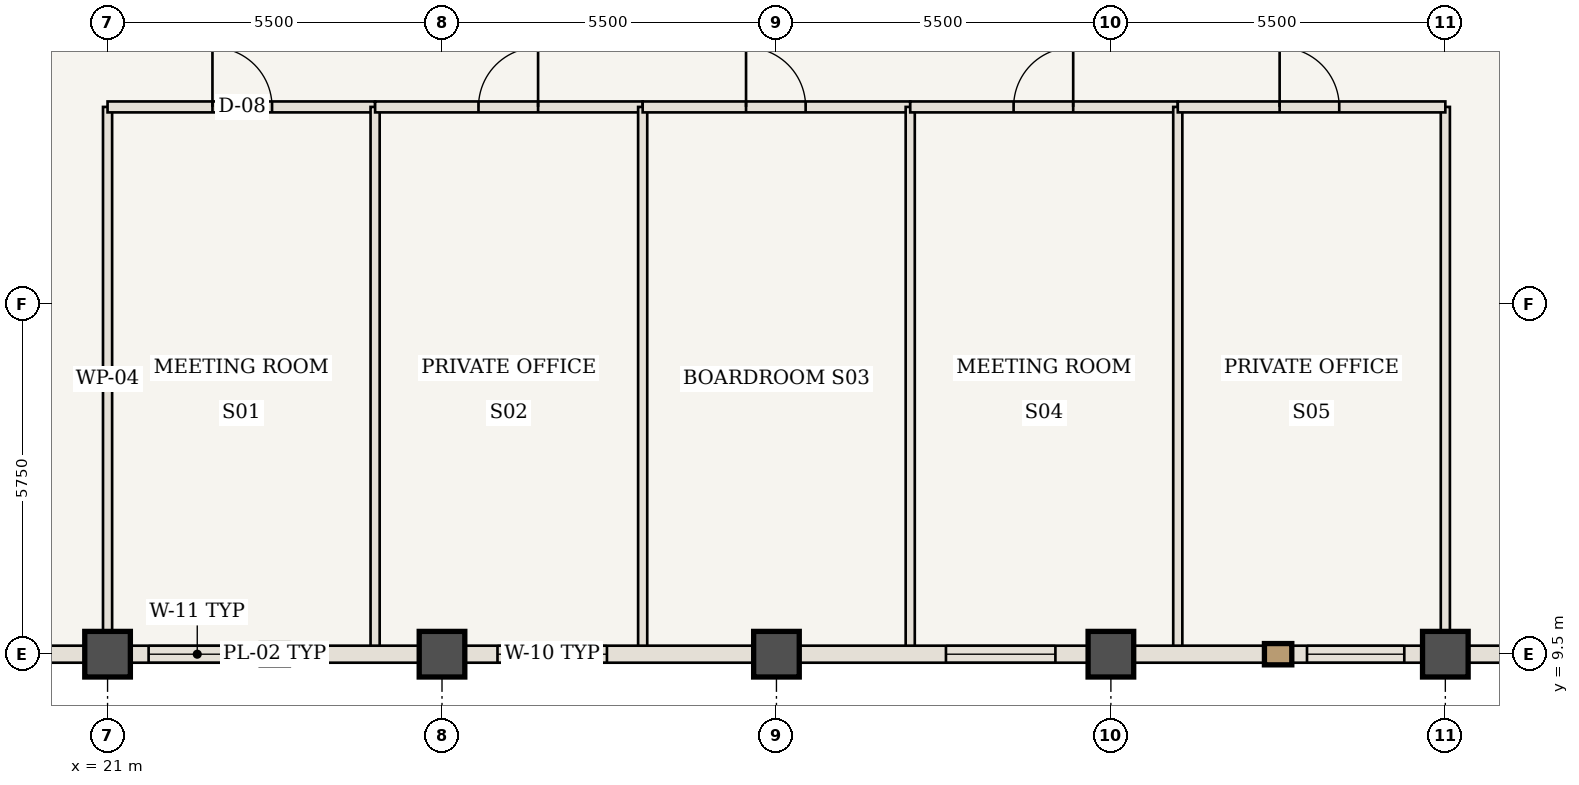
"""IFC4 building model, lengths in metres.
Left out: names, types, materials, properties, quantities, classifications, styles, units other than length and angle.
Written with IfcOpenShell. Run it as: python <this file> out.ifc"""

import sys

from ifc_helpers import new_model, si_unit, direction, frame, frame_2d, origin, origin_2d, place, context, subcontext, project, spatial, rectangle, extrude, element, fill, save


model = new_model("IFC4")
c1 = context("Model", 3, precision=1e-05, world=origin(), true_north=direction((0.0, 1.0)))
c2 = subcontext(c1, "Body", "Model", "MODEL_VIEW")
j1 = project(units=[si_unit("LENGTHUNIT", "METRE"), si_unit("PLANEANGLEUNIT", "RADIAN")], contexts=[c1])
p1 = place(None, origin())
s1 = spatial("IfcSite", under=j1, at=p1, CompositionType="ELEMENT")
p2 = place(p1, origin())
s2 = spatial("IfcBuilding", under=s1, at=p2, CompositionType="ELEMENT")
p3 = place(p2, frame((0.0, 0.0, 289.1)))
s3 = spatial("IfcBuildingStorey", under=s2, at=p3, CompositionType="ELEMENT", Elevation=289.1)
for number, where, z_axis, x_axis in (
    (1, (21.0, 9.5, 0.0), (0.0, 0.0, 1.0), (1.0, 0.0, 0.0)),
    (2, (26.5, 9.5, 0.0), (0.0, 0.0, 1.0), (1.0, 0.0, 0.0)),
    (3, (32.0, 9.5, 0.0), (0.0, 0.0, 1.0), (1.0, 0.0, 0.0)),
    (4, (37.5, 9.5, 0.0), (0.0, 0.0, 1.0), (1.0, 0.0, 0.0)),
    (5, (43.0, 9.5, 0.0), (0.0, 0.0, 1.0), (1.0, 0.0, 0.0)),
):
    element("IfcColumn", number, at=place(p3, frame(where, z_axis=z_axis, x_axis=x_axis)), inside=s3, PredefinedType="COLUMN", context=c2, shape_type="SweptSolid", body=[
        extrude(rectangle(XDim=0.75, YDim=0.75, at=origin_2d()), origin(), (0.0, 0.0, 1.0), 3.85),
    ])
for number, where, z_axis, x_axis in (
    (6, (21.0, 9.56, 0.0), (0.0, 0.0, 1.0), (0.0, 1.0, 0.0)),
    (7, (43.0, 9.56, 0.0), (0.0, 0.0, 1.0), (0.0, 1.0, 0.0)),
):
    element("IfcWall", number, at=place(p3, frame(where, z_axis=z_axis, x_axis=x_axis)), inside=s3, PredefinedType="STANDARD", context=c2, shape_type="SweptSolid", body=[
        extrude(rectangle(XDim=8.94, YDim=0.15, at=frame_2d((4.47, 0.0))), origin(), (0.0, 0.0, 1.0), 3.685),
    ])
p4 = place(p3, frame((21.0, 18.5, 0.0), z_axis=(0.0, 0.0, 1.0), x_axis=(1.0, 0.0, 0.0)))
e8 = element("IfcWall", 8, at=p4, inside=s3, PredefinedType="STANDARD", context=c2, shape_type="SweptSolid", body=[
    extrude(rectangle(XDim=4.4, YDim=0.18, at=frame_2d((2.2, 0.0))), origin(), (0.0, 0.0, 1.0), 3.685),
])
p5 = place(p4, frame((1.725, 0.0, 0.0)))
e9 = element("IfcOpeningElement", 9, at=p5, cuts=e8, PredefinedType="OPENING", context=c2, shape_type="SweptSolid", body=[
    extrude(rectangle(XDim=0.98, YDim=2.2, at=frame_2d((0.49, 1.1))), frame((0.0, 0.1, 0.0), z_axis=(0.0, -1.0, 0.0), x_axis=(1.0, 0.0, 0.0)), (0.0, 0.0, 1.0), 0.2),
])
p6 = place(p3, frame((25.4, 9.56, 0.0), z_axis=(0.0, 0.0, 1.0), x_axis=(0.0, 1.0, 0.0)))
e10 = element("IfcWall", 10, at=p6, inside=s3, PredefinedType="STANDARD", context=c2, shape_type="SweptSolid", body=[
    extrude(rectangle(XDim=8.94, YDim=0.15, at=frame_2d((4.47, 0.0))), origin(), (0.0, 0.0, 1.0), 3.685),
])
p7 = place(p3, frame((25.4, 18.5, 0.0), z_axis=(0.0, 0.0, 1.0), x_axis=(1.0, 0.0, 0.0)))
e11 = element("IfcWall", 11, at=p7, inside=s3, PredefinedType="STANDARD", context=c2, shape_type="SweptSolid", body=[
    extrude(rectangle(XDim=4.4, YDim=0.18, at=frame_2d((2.2, 0.0))), origin(), (0.0, 0.0, 1.0), 3.685),
])
p8 = place(p7, frame((1.7, 0.0, 0.0)))
e12 = element("IfcOpeningElement", 12, at=p8, cuts=e11, PredefinedType="OPENING", context=c2, shape_type="SweptSolid", body=[
    extrude(rectangle(XDim=0.98, YDim=2.2, at=frame_2d((0.49, 1.1))), frame((0.0, 0.1, 0.0), z_axis=(0.0, -1.0, 0.0), x_axis=(1.0, 0.0, 0.0)), (0.0, 0.0, 1.0), 0.2),
])
p9 = place(p3, frame((29.8, 9.56, 0.0), z_axis=(0.0, 0.0, 1.0), x_axis=(0.0, 1.0, 0.0)))
e13 = element("IfcWall", 13, at=p9, inside=s3, PredefinedType="STANDARD", context=c2, shape_type="SweptSolid", body=[
    extrude(rectangle(XDim=8.94, YDim=0.15, at=frame_2d((4.47, 0.0))), origin(), (0.0, 0.0, 1.0), 3.685),
])
p10 = place(p3, frame((29.8, 18.5, 0.0), z_axis=(0.0, 0.0, 1.0), x_axis=(1.0, 0.0, 0.0)))
e14 = element("IfcWall", 14, at=p10, inside=s3, PredefinedType="STANDARD", context=c2, shape_type="SweptSolid", body=[
    extrude(rectangle(XDim=4.4, YDim=0.18, at=frame_2d((2.2, 0.0))), origin(), (0.0, 0.0, 1.0), 3.685),
])
p11 = place(p10, frame((1.7, 0.0, 0.0)))
e15 = element("IfcOpeningElement", 15, at=p11, cuts=e14, PredefinedType="OPENING", context=c2, shape_type="SweptSolid", body=[
    extrude(rectangle(XDim=0.98, YDim=2.2, at=frame_2d((0.49, 1.1))), frame((0.0, 0.1, 0.0), z_axis=(0.0, -1.0, 0.0), x_axis=(1.0, 0.0, 0.0)), (0.0, 0.0, 1.0), 0.2),
])
p12 = place(p3, frame((34.2, 9.56, 0.0), z_axis=(0.0, 0.0, 1.0), x_axis=(0.0, 1.0, 0.0)))
e16 = element("IfcWall", 16, at=p12, inside=s3, PredefinedType="STANDARD", context=c2, shape_type="SweptSolid", body=[
    extrude(rectangle(XDim=8.94, YDim=0.15, at=frame_2d((4.47, 0.0))), origin(), (0.0, 0.0, 1.0), 3.685),
])
p13 = place(p3, frame((34.2, 18.5, 0.0), z_axis=(0.0, 0.0, 1.0), x_axis=(1.0, 0.0, 0.0)))
e17 = element("IfcWall", 17, at=p13, inside=s3, PredefinedType="STANDARD", context=c2, shape_type="SweptSolid", body=[
    extrude(rectangle(XDim=4.4, YDim=0.18, at=frame_2d((2.2, 0.0))), origin(), (0.0, 0.0, 1.0), 3.685),
])
p14 = place(p13, frame((1.7, 0.0, 0.0)))
e18 = element("IfcOpeningElement", 18, at=p14, cuts=e17, PredefinedType="OPENING", context=c2, shape_type="SweptSolid", body=[
    extrude(rectangle(XDim=0.98, YDim=2.2, at=frame_2d((0.49, 1.1))), frame((0.0, 0.1, 0.0), z_axis=(0.0, -1.0, 0.0), x_axis=(1.0, 0.0, 0.0)), (0.0, 0.0, 1.0), 0.2),
])
p15 = place(p3, frame((38.6, 9.56, 0.0), z_axis=(0.0, 0.0, 1.0), x_axis=(0.0, 1.0, 0.0)))
e19 = element("IfcWall", 19, at=p15, inside=s3, PredefinedType="STANDARD", context=c2, shape_type="SweptSolid", body=[
    extrude(rectangle(XDim=8.94, YDim=0.15, at=frame_2d((4.47, 0.0))), origin(), (0.0, 0.0, 1.0), 3.685),
])
p16 = place(p3, frame((38.6, 18.5, 0.0), z_axis=(0.0, 0.0, 1.0), x_axis=(1.0, 0.0, 0.0)))
e20 = element("IfcWall", 20, at=p16, inside=s3, PredefinedType="STANDARD", context=c2, shape_type="SweptSolid", body=[
    extrude(rectangle(XDim=4.4, YDim=0.18, at=frame_2d((2.2, 0.0))), origin(), (0.0, 0.0, 1.0), 3.685),
])
p17 = place(p16, frame((1.675, 0.0, 0.0)))
e21 = element("IfcOpeningElement", 21, at=p17, cuts=e20, PredefinedType="OPENING", context=c2, shape_type="SweptSolid", body=[
    extrude(rectangle(XDim=0.98, YDim=2.2, at=frame_2d((0.49, 1.1))), frame((0.0, 0.1, 0.0), z_axis=(0.0, -1.0, 0.0), x_axis=(1.0, 0.0, 0.0)), (0.0, 0.0, 1.0), 0.2),
])
p18 = place(p3, frame((21.0, 9.5, 0.0), z_axis=(0.0, 0.0, 1.0), x_axis=(-1.0, 0.0, 0.0)))
e22 = element("IfcWall", 22, at=p18, inside=s3, PredefinedType="USERDEFINED", context=c2, shape_type="SweptSolid", body=[
    extrude(rectangle(XDim=5.5, YDim=0.28, at=frame_2d((2.75, 0.0))), origin(), (0.0, 0.0, 1.0), 2.985),
])
p19 = place(p3, frame((26.5, 9.5, 0.0), z_axis=(0.0, 0.0, 1.0), x_axis=(-1.0, 0.0, 0.0)))
e23 = element("IfcWall", 23, at=p19, inside=s3, PredefinedType="USERDEFINED", context=c2, shape_type="SweptSolid", body=[
    extrude(rectangle(XDim=5.5, YDim=0.28, at=frame_2d((2.75, 0.0))), origin(), (0.0, 0.0, 1.0), 2.985),
])
p20 = place(p19, frame((3.225, 0.0, 0.85)))
e24 = element("IfcOpeningElement", 24, at=p20, cuts=e23, PredefinedType="OPENING", context=c2, shape_type="SweptSolid", body=[
    extrude(rectangle(XDim=1.6, YDim=1.935, at=frame_2d((0.8, 0.968))), frame((0.0, 0.15, 0.0), z_axis=(0.0, -1.0, 0.0), x_axis=(1.0, 0.0, 0.0)), (0.0, 0.0, 1.0), 0.3),
])
p21 = place(p3, frame((32.0, 9.5, 0.0), z_axis=(0.0, 0.0, 1.0), x_axis=(-1.0, 0.0, 0.0)))
e25 = element("IfcWall", 25, at=p21, inside=s3, PredefinedType="USERDEFINED", context=c2, shape_type="SweptSolid", body=[
    extrude(rectangle(XDim=5.5, YDim=0.28, at=frame_2d((2.75, 0.0))), origin(), (0.0, 0.0, 1.0), 2.985),
])
p22 = place(p21, frame((2.788, 0.0, 0.85)))
e26 = element("IfcOpeningElement", 26, at=p22, cuts=e25, PredefinedType="OPENING", context=c2, shape_type="SweptSolid", body=[
    extrude(rectangle(XDim=1.8, YDim=1.935, at=frame_2d((0.9, 0.968))), frame((0.0, 0.15, 0.0), z_axis=(0.0, -1.0, 0.0), x_axis=(1.0, 0.0, 0.0)), (0.0, 0.0, 1.0), 0.3),
])
p23 = place(p3, frame((37.5, 9.5, 0.0), z_axis=(0.0, 0.0, 1.0), x_axis=(-1.0, 0.0, 0.0)))
e27 = element("IfcWall", 27, at=p23, inside=s3, PredefinedType="USERDEFINED", context=c2, shape_type="SweptSolid", body=[
    extrude(rectangle(XDim=5.5, YDim=0.28, at=frame_2d((2.75, 0.0))), origin(), (0.0, 0.0, 1.0), 2.985),
])
p24 = place(p23, frame((0.913, 0.0, 0.85)))
e28 = element("IfcOpeningElement", 28, at=p24, cuts=e27, PredefinedType="OPENING", context=c2, shape_type="SweptSolid", body=[
    extrude(rectangle(XDim=1.8, YDim=1.935, at=frame_2d((0.9, 0.968))), frame((0.0, 0.15, 0.0), z_axis=(0.0, -1.0, 0.0), x_axis=(1.0, 0.0, 0.0)), (0.0, 0.0, 1.0), 0.3),
])
p25 = place(p3, frame((43.0, 9.5, 0.0), z_axis=(0.0, 0.0, 1.0), x_axis=(-1.0, 0.0, 0.0)))
e29 = element("IfcWall", 29, at=p25, inside=s3, PredefinedType="USERDEFINED", context=c2, shape_type="SweptSolid", body=[
    extrude(rectangle(XDim=5.5, YDim=0.28, at=frame_2d((2.75, 0.0))), origin(), (0.0, 0.0, 1.0), 2.985),
])
p26 = place(p25, frame((0.675, 0.0, 0.85)))
e30 = element("IfcOpeningElement", 30, at=p26, cuts=e29, PredefinedType="OPENING", context=c2, shape_type="SweptSolid", body=[
    extrude(rectangle(XDim=1.6, YDim=1.935, at=frame_2d((0.8, 0.968))), frame((0.0, 0.15, 0.0), z_axis=(0.0, -1.0, 0.0), x_axis=(1.0, 0.0, 0.0)), (0.0, 0.0, 1.0), 0.3),
])
p27 = place(p3, frame((48.5, 9.5, 0.0), z_axis=(0.0, 0.0, 1.0), x_axis=(-1.0, 0.0, 0.0)))
e31 = element("IfcWall", 31, at=p27, inside=s3, PredefinedType="USERDEFINED", context=c2, shape_type="SweptSolid", body=[
    extrude(rectangle(XDim=5.5, YDim=0.28, at=frame_2d((2.75, 0.0))), origin(), (0.0, 0.0, 1.0), 2.985),
])
p28 = place(p5, origin())
e32 = element("IfcDoor", 32, at=p28, inside=s3, OperationType="SINGLE_SWING_LEFT", PredefinedType="DOOR", context=c2, shape_type="SweptSolid", body=[
    extrude(rectangle(XDim=0.98, YDim=2.2, at=frame_2d((0.49, 1.1))), frame((0.0, 0.025, 0.0), z_axis=(0.0, -1.0, 0.0), x_axis=(1.0, 0.0, 0.0)), (0.0, 0.0, 1.0), 0.05),
])
fill(e9, e32)
p29 = place(p8, origin())
e33 = element("IfcDoor", 33, at=p29, inside=s3, OperationType="SINGLE_SWING_RIGHT", PredefinedType="DOOR", context=c2, shape_type="SweptSolid", body=[
    extrude(rectangle(XDim=0.98, YDim=2.2, at=frame_2d((0.49, 1.1))), frame((0.0, 0.025, 0.0), z_axis=(0.0, -1.0, 0.0), x_axis=(1.0, 0.0, 0.0)), (0.0, 0.0, 1.0), 0.05),
])
fill(e12, e33)
p30 = place(p11, origin())
e34 = element("IfcDoor", 34, at=p30, inside=s3, OperationType="SINGLE_SWING_LEFT", PredefinedType="DOOR", context=c2, shape_type="SweptSolid", body=[
    extrude(rectangle(XDim=0.98, YDim=2.2, at=frame_2d((0.49, 1.1))), frame((0.0, 0.025, 0.0), z_axis=(0.0, -1.0, 0.0), x_axis=(1.0, 0.0, 0.0)), (0.0, 0.0, 1.0), 0.05),
])
fill(e15, e34)
p31 = place(p14, origin())
e35 = element("IfcDoor", 35, at=p31, inside=s3, OperationType="SINGLE_SWING_RIGHT", PredefinedType="DOOR", context=c2, shape_type="SweptSolid", body=[
    extrude(rectangle(XDim=0.98, YDim=2.2, at=frame_2d((0.49, 1.1))), frame((0.0, 0.025, 0.0), z_axis=(0.0, -1.0, 0.0), x_axis=(1.0, 0.0, 0.0)), (0.0, 0.0, 1.0), 0.05),
])
fill(e18, e35)
p32 = place(p17, origin())
e36 = element("IfcDoor", 36, at=p32, inside=s3, OperationType="SINGLE_SWING_LEFT", PredefinedType="DOOR", context=c2, shape_type="SweptSolid", body=[
    extrude(rectangle(XDim=0.98, YDim=2.2, at=frame_2d((0.49, 1.1))), frame((0.0, 0.025, 0.0), z_axis=(0.0, -1.0, 0.0), x_axis=(1.0, 0.0, 0.0)), (0.0, 0.0, 1.0), 0.05),
])
fill(e21, e36)
p33 = place(p20, origin())
e37 = element("IfcWindow", 37, at=p33, inside=s3, PartitioningType="SINGLE_PANEL", PredefinedType="WINDOW", context=c2, shape_type="SweptSolid", body=[
    extrude(rectangle(XDim=1.6, YDim=1.935, at=frame_2d((0.8, 0.968))), frame((0.0, 0.03, 0.0), z_axis=(0.0, -1.0, 0.0), x_axis=(1.0, 0.0, 0.0)), (0.0, 0.0, 1.0), 0.06),
])
fill(e24, e37)
p34 = place(p22, origin())
e38 = element("IfcWindow", 38, at=p34, inside=s3, PartitioningType="SINGLE_PANEL", PredefinedType="WINDOW", context=c2, shape_type="SweptSolid", body=[
    extrude(rectangle(XDim=1.8, YDim=1.935, at=frame_2d((0.9, 0.968))), frame((0.0, 0.03, 0.0), z_axis=(0.0, -1.0, 0.0), x_axis=(1.0, 0.0, 0.0)), (0.0, 0.0, 1.0), 0.06),
])
fill(e26, e38)
p35 = place(p24, origin())
e39 = element("IfcWindow", 39, at=p35, inside=s3, PartitioningType="SINGLE_PANEL", PredefinedType="WINDOW", context=c2, shape_type="SweptSolid", body=[
    extrude(rectangle(XDim=1.8, YDim=1.935, at=frame_2d((0.9, 0.968))), frame((0.0, 0.03, 0.0), z_axis=(0.0, -1.0, 0.0), x_axis=(1.0, 0.0, 0.0)), (0.0, 0.0, 1.0), 0.06),
])
fill(e28, e39)
p36 = place(p26, origin())
e40 = element("IfcWindow", 40, at=p36, inside=s3, PartitioningType="SINGLE_PANEL", PredefinedType="WINDOW", context=c2, shape_type="SweptSolid", body=[
    extrude(rectangle(XDim=1.6, YDim=1.935, at=frame_2d((0.8, 0.968))), frame((0.0, 0.03, 0.0), z_axis=(0.0, -1.0, 0.0), x_axis=(1.0, 0.0, 0.0)), (0.0, 0.0, 1.0), 0.06),
])
fill(e30, e40)
save(model, sys.argv[1])
